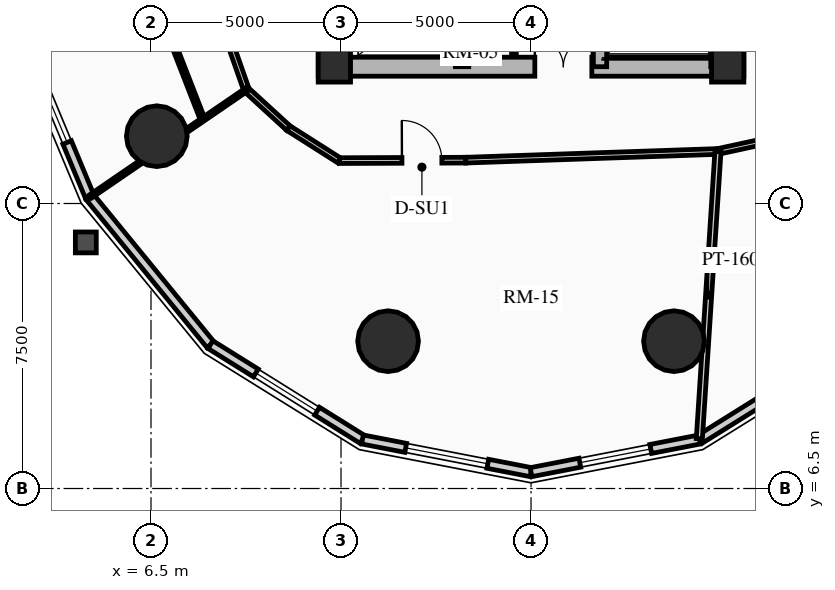
"""IFC4 building model, lengths in metres.
Left out: names, types, materials, properties, quantities, classifications, styles, units other than length and angle.
Written with IfcOpenShell. Run it as: python <this file> out.ifc"""

import sys

from ifc_helpers import new_model, si_unit, direction, frame, frame_2d, origin, origin_2d, place, context, subcontext, project, spatial, rectangle, circle, extrude, source, transform, mapped, element, fill, save


model = new_model("IFC4")
c1 = context("Model", 3, precision=1e-05, world=origin(), true_north=direction((0.0, 1.0)))
c2 = subcontext(c1, "Body", "Model", "MODEL_VIEW")
j1 = project(units=[si_unit("LENGTHUNIT", "METRE"), si_unit("PLANEANGLEUNIT", "RADIAN")], contexts=[c1])
p1 = place(None, origin())
s1 = spatial("IfcSite", under=j1, at=p1, CompositionType="ELEMENT")
p2 = place(p1, origin())
s2 = spatial("IfcBuilding", under=s1, at=p2, CompositionType="ELEMENT")
p3 = place(p2, frame((0.0, 0.0, 27.82)))
s3 = spatial("IfcBuildingStorey", under=s2, at=p3, CompositionType="ELEMENT", Elevation=27.82)
for number, where, z_axis, x_axis in (
    (1, (11.15, 17.35, 0.0), (0.0, 0.0, 1.0), (0.0, 1.0, 0.0)),
    (2, (21.85, 17.35, 0.0), (0.0, 0.0, 1.0), (0.0, 1.0, 0.0)),
):
    element("IfcWall", number, at=place(p3, frame(where, z_axis=z_axis, x_axis=x_axis)), inside=s3, PredefinedType="SHEAR", context=c2, shape_type="SweptSolid", body=[
        extrude(rectangle(XDim=14.3, YDim=0.5, at=frame_2d((7.15, 0.0))), origin(), (0.0, 0.0, 1.0), 2.91),
    ])
p4 = place(p3, frame((11.15, 17.6, 0.0), z_axis=(0.0, 0.0, 1.0), x_axis=(1.0, 0.0, 0.0)))
e3 = element("IfcWall", 3, at=p4, inside=s3, PredefinedType="SHEAR", context=c2, shape_type="SweptSolid", body=[
    extrude(rectangle(XDim=10.7, YDim=0.5, at=frame_2d((5.35, 0.0))), origin(), (0.0, 0.0, 1.0), 2.91),
])
m1 = source(origin(), c2, "Body", "SweptSolid", [
    extrude(rectangle(XDim=1.5, YDim=2.02, at=frame_2d((0.75, 1.01))), frame((0.0, 0.26, 0.0), z_axis=(0.0, -1.0, 0.0), x_axis=(1.0, 0.0, 0.0)), (0.0, 0.0, 1.0), 0.52),
])
p5 = place(p4, frame((5.45, 0.0, 0.0)))
e4 = element("IfcOpeningElement", 4, at=p5, cuts=e3, PredefinedType="OPENING", context=c2, shape_type="MappedRepresentation", body=[
    mapped(m1, transform((0.0, 0.0, 0.0), x_axis=(1.0, 0.0, 0.0), y_axis=(0.0, 1.0, 0.0), z_axis=(0.0, 0.0, 1.0), scale=1.0)),
])
p6 = place(p3, frame((14.685, 17.6, 0.0), z_axis=(0.0, 0.0, 1.0), x_axis=(0.0, 1.0, 0.0)))
e5 = element("IfcWall", 5, at=p6, inside=s3, PredefinedType="SHEAR", context=c2, shape_type="SweptSolid", body=[
    extrude(rectangle(XDim=13.8, YDim=0.35, at=frame_2d((6.9, 0.0))), origin(), (0.0, 0.0, 1.0), 2.91),
])
m2 = source(origin(), c2, "Body", "SweptSolid", [
    extrude(rectangle(XDim=1.1, YDim=2.015, at=frame_2d((0.55, 1.007))), frame((0.0, 0.185, 0.0), z_axis=(0.0, -1.0, 0.0), x_axis=(1.0, 0.0, 0.0)), (0.0, 0.0, 1.0), 0.37),
])
p7 = place(p6, frame((4.9, 0.0, 0.0)))
e6 = element("IfcOpeningElement", 6, at=p7, cuts=e5, PredefinedType="OPENING", context=c2, shape_type="MappedRepresentation", body=[
    mapped(m2, transform((0.0, 0.0, 0.0), x_axis=(1.0, 0.0, 0.0), y_axis=(0.0, 1.0, 0.0), z_axis=(0.0, 0.0, 1.0), scale=1.0)),
])
m3 = source(origin(), c2, "Body", "SweptSolid", [
    extrude(rectangle(XDim=1.15, YDim=2.02, at=frame_2d((0.575, 1.01))), frame((0.0, 0.185, 0.0), z_axis=(0.0, -1.0, 0.0), x_axis=(1.0, 0.0, 0.0)), (0.0, 0.0, 1.0), 0.37),
])
p8 = place(p6, frame((7.32, 0.0, 0.0)))
e7 = element("IfcOpeningElement", 7, at=p8, cuts=e5, PredefinedType="OPENING", context=c2, shape_type="MappedRepresentation", body=[
    mapped(m3, transform((0.0, 0.0, 0.0), x_axis=(1.0, 0.0, 0.0), y_axis=(0.0, 1.0, 0.0), z_axis=(0.0, 0.0, 1.0), scale=1.0)),
])
p9 = place(p3, frame((18.315, 17.6, 0.0), z_axis=(0.0, 0.0, 1.0), x_axis=(0.0, 1.0, 0.0)))
e8 = element("IfcWall", 8, at=p9, inside=s3, PredefinedType="SHEAR", context=c2, shape_type="SweptSolid", body=[
    extrude(rectangle(XDim=13.8, YDim=0.35, at=frame_2d((6.9, 0.0))), origin(), (0.0, 0.0, 1.0), 2.91),
])
p10 = place(p9, frame((10.025, 0.0, 0.0)))
e9 = element("IfcOpeningElement", 9, at=p10, cuts=e8, PredefinedType="OPENING", context=c2, shape_type="MappedRepresentation", body=[
    mapped(m2, transform((0.0, 0.0, 0.0), x_axis=(1.0, 0.0, 0.0), y_axis=(0.0, 1.0, 0.0), z_axis=(0.0, 0.0, 1.0), scale=1.0)),
])
p11 = place(p9, frame((12.025, 0.0, 0.0)))
e10 = element("IfcOpeningElement", 10, at=p11, cuts=e8, PredefinedType="OPENING", context=c2, shape_type="MappedRepresentation", body=[
    mapped(m2, transform((0.0, 0.0, 0.0), x_axis=(1.0, 0.0, 0.0), y_axis=(0.0, 1.0, 0.0), z_axis=(0.0, 0.0, 1.0), scale=1.0)),
])
p12 = place(p9, frame((5.33, 0.0, 0.0)))
e11 = element("IfcOpeningElement", 11, at=p12, cuts=e8, PredefinedType="OPENING", context=c2, shape_type="MappedRepresentation", body=[
    mapped(m3, transform((0.0, 0.0, 0.0), x_axis=(1.0, 0.0, 0.0), y_axis=(0.0, 1.0, 0.0), z_axis=(0.0, 0.0, 1.0), scale=1.0)),
])
p13 = place(p3, frame((21.405, 17.6, 0.0), z_axis=(0.0, 0.0, 1.0), x_axis=(0.0, 1.0, 0.0)))
e12 = element("IfcWall", 12, at=p13, inside=s3, PredefinedType="SHEAR", context=c2, shape_type="SweptSolid", body=[
    extrude(rectangle(XDim=6.745, YDim=0.35, at=frame_2d((3.373, 0.0))), origin(), (0.0, 0.0, 1.0), 2.91),
])
for number, where, z_axis, x_axis in (
    (13, (11.325, 17.62, 0.0), (0.0, 0.0, 1.0), (1.0, 0.0, 0.0)),
    (14, (21.675, 17.62, 0.0), (0.0, 0.0, 1.0), (1.0, 0.0, 0.0)),
):
    element("IfcColumn", number, at=place(p3, frame(where, z_axis=z_axis, x_axis=x_axis)), inside=s3, PredefinedType="COLUMN", context=c2, shape_type="SweptSolid", body=[
        extrude(rectangle(XDim=0.85, YDim=0.85, at=origin_2d()), origin(), (0.0, 0.0, 1.0), 2.91),
    ])
for number, where, z_axis, x_axis in (
    (15, (6.653, 15.771, 0.0), (0.0, 0.0, 1.0), (1.0, 0.0, 0.0)),
    (16, (12.739, 10.377, 0.0), (0.0, 0.0, 1.0), (1.0, 0.0, 0.0)),
    (17, (20.261, 10.377, 0.0), (0.0, 0.0, 1.0), (1.0, 0.0, 0.0)),
):
    element("IfcColumn", number, at=place(p3, frame(where, z_axis=z_axis, x_axis=x_axis)), inside=s3, PredefinedType="USERDEFINED", context=c2, shape_type="SweptSolid", body=[
        extrude(circle(Radius=0.8, at=origin_2d()), origin(), (0.0, 0.0, 1.0), 2.91),
    ])
p14 = place(p3, frame((4.89, 14.173, 0.0), z_axis=(0.0, 0.0, 1.0), x_axis=(-0.384255919668, 0.923226618009, 0.0)))
e18 = element("IfcWall", 18, at=p14, inside=s3, PredefinedType="SOLIDWALL", context=c2, shape_type="SweptSolid", body=[
    extrude(rectangle(XDim=5.305, YDim=0.24, at=frame_2d((2.653, 0.0))), origin(), (0.0, 0.0, 1.0), 2.635),
])
m4 = source(origin(), c2, "Body", "SweptSolid", [
    extrude(rectangle(XDim=2.2, YDim=1.35, at=frame_2d((1.1, 0.675))), frame((0.0, 0.13, 0.0), z_axis=(0.0, -1.0, 0.0), x_axis=(1.0, 0.0, 0.0)), (0.0, 0.0, 1.0), 0.26),
])
p15 = place(p14, frame((1.553, 0.0, 0.65)))
e19 = element("IfcOpeningElement", 19, at=p15, cuts=e18, PredefinedType="OPENING", context=c2, shape_type="MappedRepresentation", body=[
    mapped(m4, transform((0.0, 0.0, 0.0), x_axis=(1.0, 0.0, 0.0), y_axis=(0.0, 1.0, 0.0), z_axis=(0.0, 0.0, 1.0), scale=1.0)),
])
p16 = place(p3, frame((8.065, 10.286, 0.0), z_axis=(0.0, 0.0, 1.0), x_axis=(-0.632588557044, 0.774488035735, 0.0)))
e20 = element("IfcWall", 20, at=p16, inside=s3, PredefinedType="SOLIDWALL", context=c2, shape_type="SweptSolid", body=[
    extrude(rectangle(XDim=5.019, YDim=0.24, at=frame_2d((2.509, 0.0))), origin(), (0.0, 0.0, 1.0), 2.635),
])
p17 = place(p3, frame((12.065, 7.79, 0.0), z_axis=(0.0, 0.0, 1.0), x_axis=(-0.848422721916, 0.529319265601, 0.0)))
e21 = element("IfcWall", 21, at=p17, inside=s3, PredefinedType="SOLIDWALL", context=c2, shape_type="SweptSolid", body=[
    extrude(rectangle(XDim=4.715, YDim=0.24, at=frame_2d((2.357, 0.0))), origin(), (0.0, 0.0, 1.0), 2.635),
])
m5 = source(origin(), c2, "Body", "SweptSolid", [
    extrude(rectangle(XDim=1.9, YDim=1.35, at=frame_2d((0.95, 0.675))), frame((0.0, 0.13, 0.0), z_axis=(0.0, -1.0, 0.0), x_axis=(1.0, 0.0, 0.0)), (0.0, 0.0, 1.0), 0.26),
])
p18 = place(p17, frame((1.408, 0.0, 0.65)))
e22 = element("IfcOpeningElement", 22, at=p18, cuts=e21, PredefinedType="OPENING", context=c2, shape_type="MappedRepresentation", body=[
    mapped(m5, transform((0.0, 0.0, 0.0), x_axis=(1.0, 0.0, 0.0), y_axis=(0.0, 1.0, 0.0), z_axis=(0.0, 0.0, 1.0), scale=1.0)),
])
p19 = place(p3, frame((16.5, 6.93, 0.0), z_axis=(0.0, 0.0, 1.0), x_axis=(-0.981717351035, 0.190344536766, 0.0)))
e23 = element("IfcWall", 23, at=p19, inside=s3, PredefinedType="SOLIDWALL", context=c2, shape_type="SweptSolid", body=[
    extrude(rectangle(XDim=4.517, YDim=0.24, at=frame_2d((2.259, 0.0))), origin(), (0.0, 0.0, 1.0), 2.635),
])
p20 = place(p19, frame((1.159, 0.0, 0.65)))
e24 = element("IfcOpeningElement", 24, at=p20, cuts=e23, PredefinedType="OPENING", context=c2, shape_type="MappedRepresentation", body=[
    mapped(m4, transform((0.0, 0.0, 0.0), x_axis=(1.0, 0.0, 0.0), y_axis=(0.0, 1.0, 0.0), z_axis=(0.0, 0.0, 1.0), scale=1.0)),
])
p21 = place(p3, frame((20.935, 7.79, 0.0), z_axis=(0.0, 0.0, 1.0), x_axis=(-0.981717351035, -0.190344536766, 0.0)))
e25 = element("IfcWall", 25, at=p21, inside=s3, PredefinedType="SOLIDWALL", context=c2, shape_type="SweptSolid", body=[
    extrude(rectangle(XDim=4.517, YDim=0.24, at=frame_2d((2.259, 0.0))), origin(), (0.0, 0.0, 1.0), 2.635),
])
p22 = place(p21, frame((1.309, 0.0, 0.65)))
e26 = element("IfcOpeningElement", 26, at=p22, cuts=e25, PredefinedType="OPENING", context=c2, shape_type="MappedRepresentation", body=[
    mapped(m5, transform((0.0, 0.0, 0.0), x_axis=(1.0, 0.0, 0.0), y_axis=(0.0, 1.0, 0.0), z_axis=(0.0, 0.0, 1.0), scale=1.0)),
])
p23 = place(p3, frame((24.935, 10.286, 0.0), z_axis=(0.0, 0.0, 1.0), x_axis=(-0.848422721916, -0.529319265601, 0.0)))
e27 = element("IfcWall", 27, at=p23, inside=s3, PredefinedType="SOLIDWALL", context=c2, shape_type="SweptSolid", body=[
    extrude(rectangle(XDim=4.715, YDim=0.24, at=frame_2d((2.357, 0.0))), origin(), (0.0, 0.0, 1.0), 2.635),
])
p24 = place(p3, frame((16.05, 17.92, 0.0), z_axis=(0.0, 0.0, 1.0), x_axis=(0.0, 1.0, 0.0)))
e28 = element("IfcWall", 28, at=p24, inside=s3, PredefinedType="PARTITIONING", context=c2, shape_type="SweptSolid", body=[
    extrude(rectangle(XDim=3.08, YDim=0.125, at=frame_2d((1.54, 0.0))), origin(), (0.0, 0.0, 1.0), 2.635),
])
m6 = source(origin(), c2, "Body", "SweptSolid", [
    extrude(rectangle(XDim=0.9, YDim=2.005, at=frame_2d((0.45, 1.002))), frame((0.0, 0.073, 0.0), z_axis=(0.0, -1.0, 0.0), x_axis=(1.0, 0.0, 0.0)), (0.0, 0.0, 1.0), 0.145),
])
p25 = place(p24, frame((1.05, 0.0, 0.0)))
e29 = element("IfcOpeningElement", 29, at=p25, cuts=e28, PredefinedType="OPENING", context=c2, shape_type="MappedRepresentation", body=[
    mapped(m6, transform((0.0, 0.0, 0.0), x_axis=(1.0, 0.0, 0.0), y_axis=(0.0, 1.0, 0.0), z_axis=(0.0, 0.0, 1.0), scale=1.0)),
])
p26 = place(p3, frame((8.538, 18.338, 0.0), z_axis=(0.0, 0.0, 1.0), x_axis=(0.331358150167, -0.94350504838, 0.0)))
e30 = element("IfcWall", 30, at=p26, inside=s3, PredefinedType="PARTITIONING", context=c2, shape_type="SweptSolid", body=[
    extrude(rectangle(XDim=1.424, YDim=0.15, at=frame_2d((0.712, 0.0))), origin(), (0.0, 0.0, 1.0), 2.205),
])
p27 = place(p3, frame((9.01, 16.994, 0.0), z_axis=(0.0, 0.0, 1.0), x_axis=(0.737701798986, -0.67512669609, 0.0)))
e31 = element("IfcWall", 31, at=p27, inside=s3, PredefinedType="PARTITIONING", context=c2, shape_type="SweptSolid", body=[
    extrude(rectangle(XDim=1.498, YDim=0.15, at=frame_2d((0.749, 0.0))), origin(), (0.0, 0.0, 1.0), 2.159),
])
p28 = place(p3, frame((10.115, 15.983, 0.0), z_axis=(0.0, 0.0, 1.0), x_axis=(0.843995849351, -0.536349705209, 0.0)))
e32 = element("IfcWall", 32, at=p28, inside=s3, PredefinedType="PARTITIONING", context=c2, shape_type="SweptSolid", body=[
    extrude(rectangle(XDim=1.593, YDim=0.15, at=frame_2d((0.796, 0.0))), origin(), (0.0, 0.0, 1.0), 2.205),
])
p29 = place(p3, frame((11.46, 15.129, 0.0), z_axis=(0.0, 0.0, 1.0), x_axis=(0.999993513287, 0.003601858435, 0.0)))
e33 = element("IfcWall", 33, at=p29, inside=s3, PredefinedType="PARTITIONING", context=c2, shape_type="SweptSolid", body=[
    extrude(rectangle(XDim=3.321, YDim=0.15, at=frame_2d((1.661, 0.0))), origin(), (0.0, 0.0, 1.0), 2.159),
])
m7 = source(origin(), c2, "Body", "SweptSolid", [
    extrude(rectangle(XDim=1.05, YDim=2.015, at=frame_2d((0.525, 1.007))), frame((0.0, 0.085, 0.0), z_axis=(0.0, -1.0, 0.0), x_axis=(1.0, 0.0, 0.0)), (0.0, 0.0, 1.0), 0.17),
])
p30 = place(p29, frame((1.643, 0.0, 0.0)))
e34 = element("IfcOpeningElement", 34, at=p30, cuts=e33, PredefinedType="OPENING", context=c2, shape_type="MappedRepresentation", body=[
    mapped(m7, transform((0.0, 0.0, 0.0), x_axis=(1.0, 0.0, 0.0), y_axis=(0.0, 1.0, 0.0), z_axis=(0.0, 0.0, 1.0), scale=1.0)),
])
p31 = place(p3, frame((14.781, 15.141, 0.0), z_axis=(0.0, 0.0, 1.0), x_axis=(0.999407918707, 0.034406569513, 0.0)))
e35 = element("IfcWall", 35, at=p31, inside=s3, PredefinedType="PARTITIONING", context=c2, shape_type="SweptSolid", body=[
    extrude(rectangle(XDim=6.642, YDim=0.15, at=frame_2d((3.321, 0.0))), origin(), (0.0, 0.0, 1.0), 2.159),
])
p32 = place(p3, frame((21.419, 15.369, 0.0), z_axis=(0.0, 0.0, 1.0), x_axis=(0.977192701953, 0.212354475464, 0.0)))
e36 = element("IfcWall", 36, at=p32, inside=s3, PredefinedType="PARTITIONING", context=c2, shape_type="SweptSolid", body=[
    extrude(rectangle(XDim=1.888, YDim=0.15, at=frame_2d((0.944, 0.0))), origin(), (0.0, 0.0, 1.0), 2.205),
])
p33 = place(p3, frame((9.01, 16.994, 0.0), z_axis=(0.0, 0.0, 1.0), x_axis=(-0.825130244962, -0.564942544733, 0.0)))
e37 = element("IfcWall", 37, at=p33, inside=s3, PredefinedType="MOVABLE", context=c2, shape_type="SweptSolid", body=[
    extrude(rectangle(XDim=4.974, YDim=0.1, at=frame_2d((2.487, 0.0))), origin(), (0.0, 0.0, 1.0), 2.073),
])
p34 = place(p3, frame((21.419, 15.369, 0.0), z_axis=(0.0, 0.0, 1.0), x_axis=(-0.064709408161, -0.997904149954, 0.0)))
e38 = element("IfcWall", 38, at=p34, inside=s3, PredefinedType="PARTITIONING", context=c2, shape_type="SweptSolid", body=[
    extrude(rectangle(XDim=7.576, YDim=0.16, at=frame_2d((3.788, 0.0))), origin(), (0.0, 0.0, 1.0), 2.073),
])
p35 = place(p3, frame((6.951, 18.545, 0.0), z_axis=(0.0, 0.0, 1.0), x_axis=(0.362681113276, -0.931913306093, 0.0)))
e39 = element("IfcWall", 39, at=p35, inside=s3, PredefinedType="PARTITIONING", context=c2, shape_type="SweptSolid", body=[
    extrude(rectangle(XDim=2.508, YDim=0.125, at=frame_2d((1.254, 0.0))), origin(), (0.0, 0.0, 1.0), 2.159),
])
m8 = source(origin(), c2, "Body", "SweptSolid", [
    extrude(rectangle(XDim=2.2, YDim=1.35, at=frame_2d((1.1, 0.675))), frame((0.0, 0.03, 0.0), z_axis=(0.0, -1.0, 0.0), x_axis=(1.0, 0.0, 0.0)), (0.0, 0.0, 1.0), 0.06),
])
p36 = place(p15, origin())
e40 = element("IfcWindow", 40, at=p36, inside=s3, PartitioningType="DOUBLE_PANEL_VERTICAL", PredefinedType="WINDOW", context=c2, shape_type="MappedRepresentation", body=[
    mapped(m8, transform((0.0, 0.0, 0.0), x_axis=(1.0, 0.0, 0.0), y_axis=(0.0, 1.0, 0.0), z_axis=(0.0, 0.0, 1.0), scale=1.0)),
])
fill(e19, e40)
m9 = source(origin(), c2, "Body", "SweptSolid", [
    extrude(rectangle(XDim=1.9, YDim=1.35, at=frame_2d((0.95, 0.675))), frame((0.0, 0.03, 0.0), z_axis=(0.0, -1.0, 0.0), x_axis=(1.0, 0.0, 0.0)), (0.0, 0.0, 1.0), 0.06),
])
p37 = place(p18, origin())
e41 = element("IfcWindow", 41, at=p37, inside=s3, PartitioningType="DOUBLE_PANEL_VERTICAL", PredefinedType="WINDOW", context=c2, shape_type="MappedRepresentation", body=[
    mapped(m9, transform((0.0, 0.0, 0.0), x_axis=(1.0, 0.0, 0.0), y_axis=(0.0, 1.0, 0.0), z_axis=(0.0, 0.0, 1.0), scale=1.0)),
])
fill(e22, e41)
p38 = place(p20, origin())
e42 = element("IfcWindow", 42, at=p38, inside=s3, PartitioningType="DOUBLE_PANEL_VERTICAL", PredefinedType="WINDOW", context=c2, shape_type="MappedRepresentation", body=[
    mapped(m8, transform((0.0, 0.0, 0.0), x_axis=(1.0, 0.0, 0.0), y_axis=(0.0, 1.0, 0.0), z_axis=(0.0, 0.0, 1.0), scale=1.0)),
])
fill(e24, e42)
p39 = place(p22, origin())
e43 = element("IfcWindow", 43, at=p39, inside=s3, PartitioningType="DOUBLE_PANEL_VERTICAL", PredefinedType="WINDOW", context=c2, shape_type="MappedRepresentation", body=[
    mapped(m9, transform((0.0, 0.0, 0.0), x_axis=(1.0, 0.0, 0.0), y_axis=(0.0, 1.0, 0.0), z_axis=(0.0, 0.0, 1.0), scale=1.0)),
])
fill(e26, e43)
m10 = source(origin(), c2, "Body", "SweptSolid", [
    extrude(rectangle(XDim=1.5, YDim=2.02, at=frame_2d((0.75, 1.01))), frame((0.0, 0.025, 0.0), z_axis=(0.0, -1.0, 0.0), x_axis=(1.0, 0.0, 0.0)), (0.0, 0.0, 1.0), 0.05),
])
p40 = place(p5, origin())
e44 = element("IfcDoor", 44, at=p40, inside=s3, OperationType="DOUBLE_DOOR_SINGLE_SWING", PredefinedType="DOOR", context=c2, shape_type="MappedRepresentation", body=[
    mapped(m10, transform((0.0, 0.0, 0.0), x_axis=(1.0, 0.0, 0.0), y_axis=(0.0, 1.0, 0.0), z_axis=(0.0, 0.0, 1.0), scale=1.0)),
])
fill(e4, e44)
m11 = source(origin(), c2, "Body", "SweptSolid", [
    extrude(rectangle(XDim=1.05, YDim=2.015, at=frame_2d((0.525, 1.007))), frame((0.0, 0.025, 0.0), z_axis=(0.0, -1.0, 0.0), x_axis=(1.0, 0.0, 0.0)), (0.0, 0.0, 1.0), 0.05),
])
p41 = place(p30, origin())
e45 = element("IfcDoor", 45, at=p41, inside=s3, OperationType="SINGLE_SWING_LEFT", PredefinedType="DOOR", context=c2, shape_type="MappedRepresentation", body=[
    mapped(m11, transform((0.0, 0.0, 0.0), x_axis=(1.0, 0.0, 0.0), y_axis=(0.0, 1.0, 0.0), z_axis=(0.0, 0.0, 1.0), scale=1.0)),
])
fill(e34, e45)
save(model, sys.argv[1])
